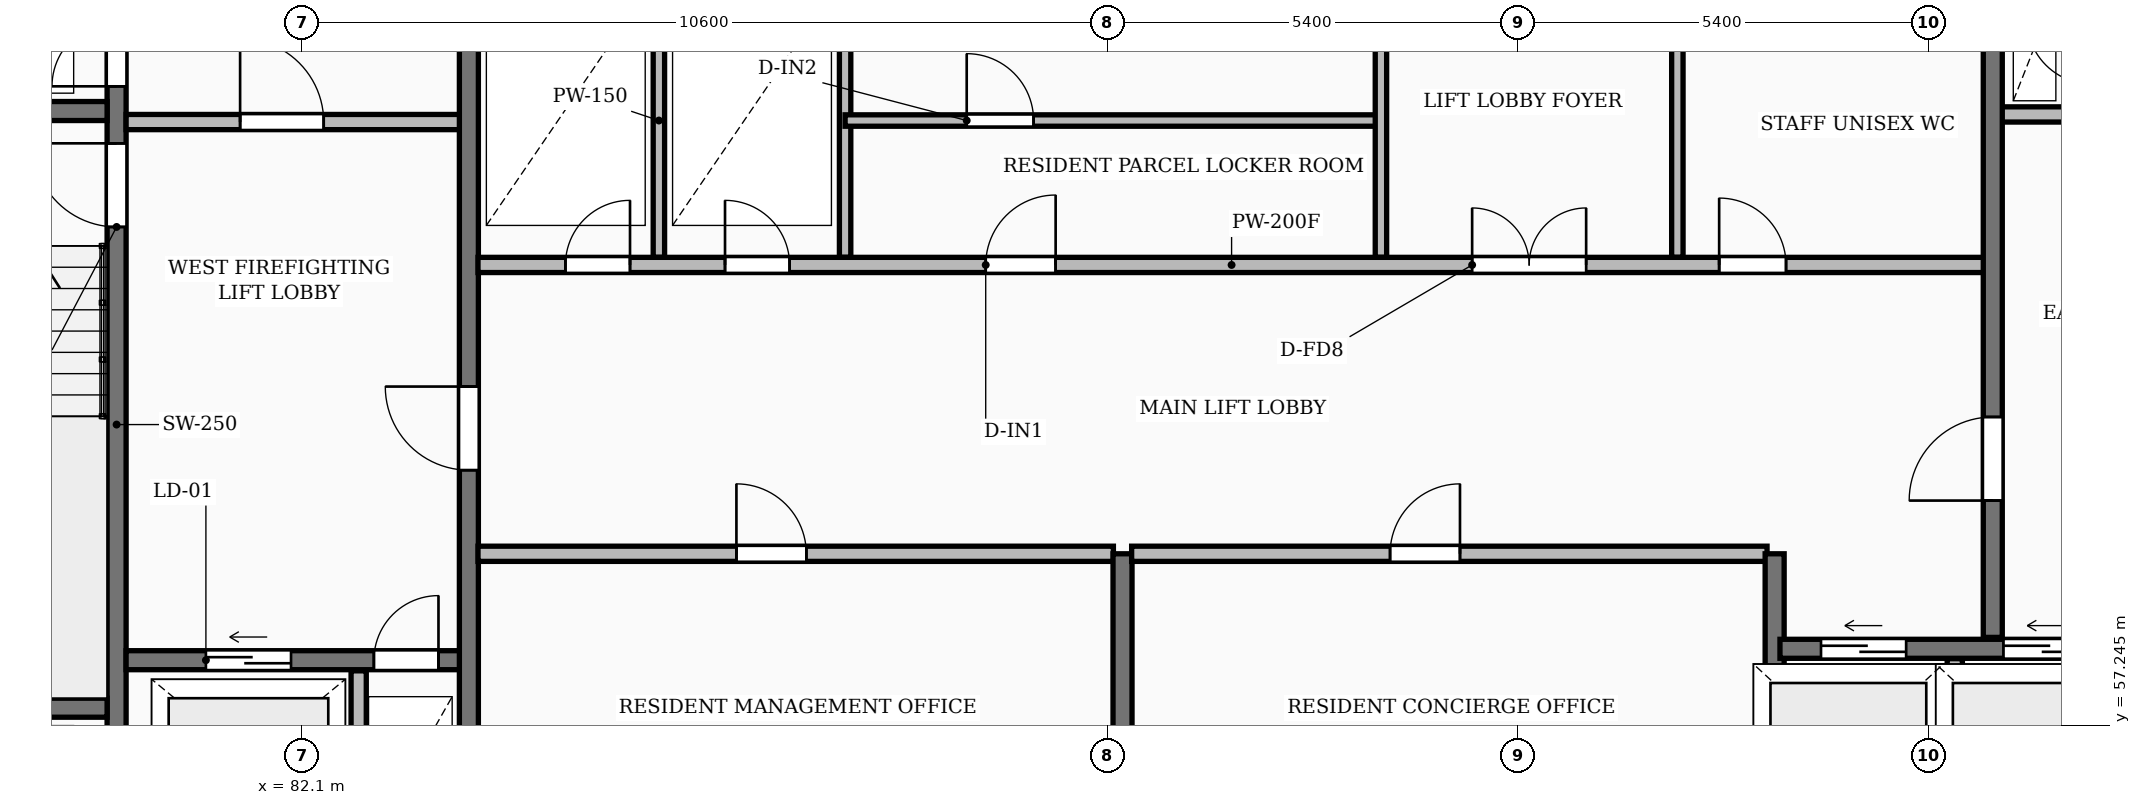
"""IFC4 building model, lengths in metres.
Left out: names, types, materials, properties, quantities, classifications, styles, units other than length and angle.
Written with IfcOpenShell. Run it as: python <this file> out.ifc"""

import sys

from ifc_helpers import new_model, si_unit, direction, frame, frame_2d, origin, place, context, subcontext, project, spatial, rectangle, extrude, element, fill, save


model = new_model("IFC4")
c1 = context("Model", 3, precision=1e-05, world=origin(), true_north=direction((0.0, 1.0)))
c2 = subcontext(c1, "Body", "Model", "MODEL_VIEW")
j1 = project(units=[si_unit("LENGTHUNIT", "METRE"), si_unit("PLANEANGLEUNIT", "RADIAN")], contexts=[c1])
p1 = place(None, origin())
s1 = spatial("IfcSite", under=j1, at=p1, CompositionType="ELEMENT")
p2 = place(p1, origin())
s2 = spatial("IfcBuilding", under=s1, at=p2, CompositionType="ELEMENT")
p3 = place(p2, frame((0.0, 0.0, 184.85)))
s3 = spatial("IfcBuildingStorey", under=s2, at=p3, CompositionType="ELEMENT", Elevation=184.85)
p4 = place(p3, frame((79.665, 55.4, 0.0), z_axis=(0.0, 0.0, 1.0), x_axis=(0.0, 1.0, 0.0)))
e1 = element("IfcWall", 1, at=p4, inside=s3, PredefinedType="SHEAR", context=c2, shape_type="SweptSolid", body=[
    extrude(rectangle(XDim=11.6, YDim=0.25, at=frame_2d((5.8, 0.0))), origin(), (0.0, 0.0, 1.0), 3.25),
])
p5 = place(p4, frame((0.55, 0.0, 0.0)))
e2 = element("IfcOpeningElement", 2, at=p5, cuts=e1, PredefinedType="OPENING", context=c2, shape_type="SweptSolid", body=[
    extrude(rectangle(XDim=0.85, YDim=2.05, at=frame_2d((0.425, 1.025))), frame((0.0, 0.135, 0.0), z_axis=(0.0, -1.0, 0.0), x_axis=(1.0, 0.0, 0.0)), (0.0, 0.0, 1.0), 0.27),
])
p6 = place(p4, frame((8.4, 0.0, 0.0)))
e3 = element("IfcOpeningElement", 3, at=p6, cuts=e1, PredefinedType="OPENING", context=c2, shape_type="SweptSolid", body=[
    extrude(rectangle(XDim=1.1, YDim=2.1, at=frame_2d((0.55, 1.05))), frame((0.0, 0.135, 0.0), z_axis=(0.0, -1.0, 0.0), x_axis=(1.0, 0.0, 0.0)), (0.0, 0.0, 1.0), 0.27),
])
p7 = place(p4, frame((10.25, 0.0, 0.0)))
e4 = element("IfcOpeningElement", 4, at=p7, cuts=e1, PredefinedType="OPENING", context=c2, shape_type="SweptSolid", body=[
    extrude(rectangle(XDim=0.85, YDim=2.05, at=frame_2d((0.425, 1.025))), frame((0.0, 0.135, 0.0), z_axis=(0.0, -1.0, 0.0), x_axis=(1.0, 0.0, 0.0)), (0.0, 0.0, 1.0), 0.27),
])
for number, where, z_axis, x_axis in (
    (5, (76.3, 57.475, 0.0), (0.0, 0.0, 1.0), (1.0, 0.0, 0.0)),
    (6, (76.3, 65.325, 0.0), (0.0, 0.0, 1.0), (1.0, 0.0, 0.0)),
):
    element("IfcWall", number, at=place(p3, frame(where, z_axis=z_axis, x_axis=x_axis)), inside=s3, PredefinedType="SHEAR", context=c2, shape_type="SweptSolid", body=[
        extrude(rectangle(XDim=3.24, YDim=0.25, at=frame_2d((1.62, 0.0))), origin(), (0.0, 0.0, 1.0), 3.25),
    ])
p8 = place(p3, frame((79.79, 58.1, 0.0), z_axis=(0.0, 0.0, 1.0), x_axis=(1.0, 0.0, 0.0)))
e7 = element("IfcWall", 7, at=p8, inside=s3, PredefinedType="SHEAR", context=c2, shape_type="SweptSolid", body=[
    extrude(rectangle(XDim=4.39, YDim=0.25, at=frame_2d((2.195, 0.0))), origin(), (0.0, 0.0, 1.0), 3.25),
])
p9 = place(p8, frame((1.05, 0.0, 0.0)))
e8 = element("IfcOpeningElement", 8, at=p9, cuts=e7, PredefinedType="OPENING", context=c2, shape_type="SweptSolid", body=[
    extrude(rectangle(XDim=1.12, YDim=2.12, at=frame_2d((0.56, 1.06))), frame((0.0, 0.135, 0.0), z_axis=(0.0, -1.0, 0.0), x_axis=(1.0, 0.0, 0.0)), (0.0, 0.0, 1.0), 0.27),
])
p10 = place(p8, frame((3.26, 0.0, 0.0)))
e9 = element("IfcOpeningElement", 9, at=p10, cuts=e7, PredefinedType="OPENING", context=c2, shape_type="SweptSolid", body=[
    extrude(rectangle(XDim=0.85, YDim=2.05, at=frame_2d((0.425, 1.025))), frame((0.0, 0.135, 0.0), z_axis=(0.0, -1.0, 0.0), x_axis=(1.0, 0.0, 0.0)), (0.0, 0.0, 1.0), 0.27),
])
p11 = place(p3, frame((82.85, 55.4, 0.0), z_axis=(0.0, 0.0, 1.0), x_axis=(0.0, 1.0, 0.0)))
e10 = element("IfcWall", 10, at=p11, inside=s3, PredefinedType="PARTITIONING", context=c2, shape_type="SweptSolid", body=[
    extrude(rectangle(XDim=2.56, YDim=0.2, at=frame_2d((1.28, 0.0))), origin(), (0.0, 0.0, 1.0), 2.97),
])
p12 = place(p3, frame((79.79, 65.18, 0.0), z_axis=(0.0, 0.0, 1.0), x_axis=(1.0, 0.0, 0.0)))
e11 = element("IfcWall", 11, at=p12, inside=s3, PredefinedType="PARTITIONING", context=c2, shape_type="SweptSolid", body=[
    extrude(rectangle(XDim=4.39, YDim=0.2, at=frame_2d((2.195, 0.0))), origin(), (0.0, 0.0, 1.0), 2.97),
])
p13 = place(p12, frame((1.5, 0.0, 0.0)))
e12 = element("IfcOpeningElement", 12, at=p13, cuts=e11, PredefinedType="OPENING", context=c2, shape_type="SweptSolid", body=[
    extrude(rectangle(XDim=1.1, YDim=2.1, at=frame_2d((0.55, 1.05))), frame((0.0, 0.11, 0.0), z_axis=(0.0, -1.0, 0.0), x_axis=(1.0, 0.0, 0.0)), (0.0, 0.0, 1.0), 0.22),
])
p14 = place(p3, frame((84.3, 55.4, 0.0), z_axis=(0.0, 0.0, 1.0), x_axis=(0.0, 1.0, 0.0)))
e13 = element("IfcWall", 13, at=p14, inside=s3, PredefinedType="SHEAR", context=c2, shape_type="SweptSolid", body=[
    extrude(rectangle(XDim=11.6, YDim=0.25, at=frame_2d((5.8, 0.0))), origin(), (0.0, 0.0, 1.0), 3.25),
])
p15 = place(p14, frame((5.2, 0.0, 0.0)))
e14 = element("IfcOpeningElement", 14, at=p15, cuts=e13, PredefinedType="OPENING", context=c2, shape_type="SweptSolid", body=[
    extrude(rectangle(XDim=1.1, YDim=2.1, at=frame_2d((0.55, 1.05))), frame((0.0, 0.135, 0.0), z_axis=(0.0, -1.0, 0.0), x_axis=(1.0, 0.0, 0.0)), (0.0, 0.0, 1.0), 0.27),
])
p16 = place(p3, frame((84.42, 59.5, 0.0), z_axis=(0.0, 0.0, 1.0), x_axis=(1.0, 0.0, 0.0)))
e15 = element("IfcWall", 15, at=p16, inside=s3, PredefinedType="PARTITIONING", context=c2, shape_type="SweptSolid", body=[
    extrude(rectangle(XDim=8.36, YDim=0.2, at=frame_2d((4.18, 0.0))), origin(), (0.0, 0.0, 1.0), 2.97),
])
p17 = place(p16, frame((3.4, 0.0, 0.0)))
e16 = element("IfcOpeningElement", 16, at=p17, cuts=e15, PredefinedType="OPENING", context=c2, shape_type="SweptSolid", body=[
    extrude(rectangle(XDim=0.92, YDim=2.08, at=frame_2d((0.46, 1.04))), frame((0.0, 0.11, 0.0), z_axis=(0.0, -1.0, 0.0), x_axis=(1.0, 0.0, 0.0)), (0.0, 0.0, 1.0), 0.22),
])
p18 = place(p3, frame((92.9, 55.4, 0.0), z_axis=(0.0, 0.0, 1.0), x_axis=(0.0, 1.0, 0.0)))
e17 = element("IfcWall", 17, at=p18, inside=s3, PredefinedType="SHEAR", context=c2, shape_type="SweptSolid", body=[
    extrude(rectangle(XDim=4.1, YDim=0.25, at=frame_2d((2.05, 0.0))), origin(), (0.0, 0.0, 1.0), 3.25),
])
p19 = place(p3, frame((93.02, 59.5, 0.0), z_axis=(0.0, 0.0, 1.0), x_axis=(1.0, 0.0, 0.0)))
e18 = element("IfcWall", 18, at=p19, inside=s3, PredefinedType="PARTITIONING", context=c2, shape_type="SweptSolid", body=[
    extrude(rectangle(XDim=8.36, YDim=0.2, at=frame_2d((4.18, 0.0))), origin(), (0.0, 0.0, 1.0), 2.97),
])
p20 = place(p19, frame((3.4, 0.0, 0.0)))
e19 = element("IfcOpeningElement", 19, at=p20, cuts=e18, PredefinedType="OPENING", context=c2, shape_type="SweptSolid", body=[
    extrude(rectangle(XDim=0.92, YDim=2.08, at=frame_2d((0.46, 1.04))), frame((0.0, 0.11, 0.0), z_axis=(0.0, -1.0, 0.0), x_axis=(1.0, 0.0, 0.0)), (0.0, 0.0, 1.0), 0.22),
])
p21 = place(p3, frame((101.48, 55.4, 0.0), z_axis=(0.0, 0.0, 1.0), x_axis=(0.0, 1.0, 0.0)))
e20 = element("IfcWall", 20, at=p21, inside=s3, PredefinedType="SHEAR", context=c2, shape_type="SweptSolid", body=[
    extrude(rectangle(XDim=4.1, YDim=0.25, at=frame_2d((2.05, 0.0))), origin(), (0.0, 0.0, 1.0), 3.25),
])
p22 = place(p3, frame((103.85, 55.4, 0.0), z_axis=(0.0, 0.0, 1.0), x_axis=(0.0, 1.0, 0.0)))
e21 = element("IfcWall", 21, at=p22, inside=s3, PredefinedType="PARTITIONING", context=c2, shape_type="SweptSolid", body=[
    extrude(rectangle(XDim=2.72, YDim=0.2, at=frame_2d((1.36, 0.0))), origin(), (0.0, 0.0, 1.0), 2.97),
])
p23 = place(p3, frame((101.55, 58.25, 0.0), z_axis=(0.0, 0.0, 1.0), x_axis=(1.0, 0.0, 0.0)))
e22 = element("IfcWall", 22, at=p23, inside=s3, PredefinedType="SHEAR", context=c2, shape_type="SweptSolid", body=[
    extrude(rectangle(XDim=4.6, YDim=0.25, at=frame_2d((2.3, 0.0))), origin(), (0.0, 0.0, 1.0), 3.25),
])
p24 = place(p23, frame((0.54, 0.0, 0.0)))
e23 = element("IfcOpeningElement", 23, at=p24, cuts=e22, PredefinedType="OPENING", context=c2, shape_type="SweptSolid", body=[
    extrude(rectangle(XDim=1.12, YDim=2.12, at=frame_2d((0.56, 1.06))), frame((0.0, 0.135, 0.0), z_axis=(0.0, -1.0, 0.0), x_axis=(1.0, 0.0, 0.0)), (0.0, 0.0, 1.0), 0.27),
])
p25 = place(p23, frame((2.94, 0.0, 0.0)))
e24 = element("IfcOpeningElement", 24, at=p25, cuts=e22, PredefinedType="OPENING", context=c2, shape_type="SweptSolid", body=[
    extrude(rectangle(XDim=1.12, YDim=2.12, at=frame_2d((0.56, 1.06))), frame((0.0, 0.135, 0.0), z_axis=(0.0, -1.0, 0.0), x_axis=(1.0, 0.0, 0.0)), (0.0, 0.0, 1.0), 0.27),
])
for number, where, z_axis, x_axis in (
    (25, (86.8, 63.4, 0.0), (0.0, 0.0, 1.0), (0.0, 1.0, 0.0)),
    (26, (89.25, 63.4, 0.0), (0.0, 0.0, 1.0), (0.0, 1.0, 0.0)),
):
    element("IfcWall", number, at=place(p3, frame(where, z_axis=z_axis, x_axis=x_axis)), inside=s3, PredefinedType="PARTITIONING", context=c2, shape_type="SweptSolid", body=[
        extrude(rectangle(XDim=3.6, YDim=0.15, at=frame_2d((1.8, 0.0))), origin(), (0.0, 0.0, 1.0), 2.97),
    ])
p26 = place(p3, frame((89.25, 65.2, 0.0), z_axis=(0.0, 0.0, 1.0), x_axis=(1.0, 0.0, 0.0)))
e27 = element("IfcWall", 27, at=p26, inside=s3, PredefinedType="PARTITIONING", context=c2, shape_type="SweptSolid", body=[
    extrude(rectangle(XDim=7.05, YDim=0.15, at=frame_2d((3.525, 0.0))), origin(), (0.0, 0.0, 1.0), 2.97),
])
p27 = place(p26, frame((1.6, 0.0, 0.0)))
e28 = element("IfcOpeningElement", 28, at=p27, cuts=e27, PredefinedType="OPENING", context=c2, shape_type="SweptSolid", body=[
    extrude(rectangle(XDim=0.88, YDim=2.06, at=frame_2d((0.44, 1.03))), frame((0.0, 0.085, 0.0), z_axis=(0.0, -1.0, 0.0), x_axis=(1.0, 0.0, 0.0)), (0.0, 0.0, 1.0), 0.17),
])
for number, where, z_axis, x_axis in (
    (29, (96.3, 63.4, 0.0), (0.0, 0.0, 1.0), (0.0, 1.0, 0.0)),
    (30, (100.2, 63.4, 0.0), (0.0, 0.0, 1.0), (0.0, 1.0, 0.0)),
):
    element("IfcWall", number, at=place(p3, frame(where, z_axis=z_axis, x_axis=x_axis)), inside=s3, PredefinedType="PARTITIONING", context=c2, shape_type="SweptSolid", body=[
        extrude(rectangle(XDim=3.6, YDim=0.15, at=frame_2d((1.8, 0.0))), origin(), (0.0, 0.0, 1.0), 2.97),
    ])
p28 = place(p3, frame((84.42, 63.3, 0.0), z_axis=(0.0, 0.0, 1.0), x_axis=(1.0, 0.0, 0.0)))
e31 = element("IfcWall", 31, at=p28, inside=s3, PredefinedType="PARTITIONING", context=c2, shape_type="SweptSolid", body=[
    extrude(rectangle(XDim=19.83, YDim=0.2, at=frame_2d((9.915, 0.0))), origin(), (0.0, 0.0, 1.0), 2.97),
])
p29 = place(p28, frame((1.15, 0.0, 0.0)))
e32 = element("IfcOpeningElement", 32, at=p29, cuts=e31, PredefinedType="OPENING", context=c2, shape_type="SweptSolid", body=[
    extrude(rectangle(XDim=0.85, YDim=2.05, at=frame_2d((0.425, 1.025))), frame((0.0, 0.11, 0.0), z_axis=(0.0, -1.0, 0.0), x_axis=(1.0, 0.0, 0.0)), (0.0, 0.0, 1.0), 0.22),
])
p30 = place(p28, frame((3.25, 0.0, 0.0)))
e33 = element("IfcOpeningElement", 33, at=p30, cuts=e31, PredefinedType="OPENING", context=c2, shape_type="SweptSolid", body=[
    extrude(rectangle(XDim=0.85, YDim=2.05, at=frame_2d((0.425, 1.025))), frame((0.0, 0.11, 0.0), z_axis=(0.0, -1.0, 0.0), x_axis=(1.0, 0.0, 0.0)), (0.0, 0.0, 1.0), 0.22),
])
p31 = place(p28, frame((13.08, 0.0, 0.0)))
e34 = element("IfcOpeningElement", 34, at=p31, cuts=e31, PredefinedType="OPENING", context=c2, shape_type="SweptSolid", body=[
    extrude(rectangle(XDim=1.5, YDim=2.2, at=frame_2d((0.75, 1.1))), frame((0.0, 0.11, 0.0), z_axis=(0.0, -1.0, 0.0), x_axis=(1.0, 0.0, 0.0)), (0.0, 0.0, 1.0), 0.22),
])
p32 = place(p28, frame((6.68, 0.0, 0.0)))
e35 = element("IfcOpeningElement", 35, at=p32, cuts=e31, PredefinedType="OPENING", context=c2, shape_type="SweptSolid", body=[
    extrude(rectangle(XDim=0.92, YDim=2.08, at=frame_2d((0.46, 1.04))), frame((0.0, 0.11, 0.0), z_axis=(0.0, -1.0, 0.0), x_axis=(1.0, 0.0, 0.0)), (0.0, 0.0, 1.0), 0.22),
])
p33 = place(p28, frame((16.33, 0.0, 0.0)))
e36 = element("IfcOpeningElement", 36, at=p33, cuts=e31, PredefinedType="OPENING", context=c2, shape_type="SweptSolid", body=[
    extrude(rectangle(XDim=0.88, YDim=2.06, at=frame_2d((0.44, 1.03))), frame((0.0, 0.11, 0.0), z_axis=(0.0, -1.0, 0.0), x_axis=(1.0, 0.0, 0.0)), (0.0, 0.0, 1.0), 0.22),
])
p34 = place(p3, frame((104.45, 65.28, 0.0), z_axis=(0.0, 0.0, 1.0), x_axis=(1.0, 0.0, 0.0)))
e37 = element("IfcWall", 37, at=p34, inside=s3, PredefinedType="PARTITIONING", context=c2, shape_type="SweptSolid", body=[
    extrude(rectangle(XDim=1.2, YDim=0.2, at=frame_2d((0.6, 0.0))), origin(), (0.0, 0.0, 1.0), 2.97),
])
p35 = place(p3, frame((104.35, 58.4, 0.0), z_axis=(0.0, 0.0, 1.0), x_axis=(0.0, 1.0, 0.0)))
e38 = element("IfcWall", 38, at=p35, inside=s3, PredefinedType="SHEAR", context=c2, shape_type="SweptSolid", body=[
    extrude(rectangle(XDim=8.6, YDim=0.25, at=frame_2d((4.3, 0.0))), origin(), (0.0, 0.0, 1.0), 3.25),
])
p36 = place(p35, frame((1.8, 0.0, 0.0)))
e39 = element("IfcOpeningElement", 39, at=p36, cuts=e38, PredefinedType="OPENING", context=c2, shape_type="SweptSolid", body=[
    extrude(rectangle(XDim=1.1, YDim=2.1, at=frame_2d((0.55, 1.05))), frame((0.0, 0.135, 0.0), z_axis=(0.0, -1.0, 0.0), x_axis=(1.0, 0.0, 0.0)), (0.0, 0.0, 1.0), 0.27),
])
p37 = place(p6, origin())
e40 = element("IfcDoor", 40, at=p37, inside=s3, OperationType="SINGLE_SWING_RIGHT", PredefinedType="DOOR", context=c2, shape_type="SweptSolid", body=[
    extrude(rectangle(XDim=1.1, YDim=2.1, at=frame_2d((0.55, 1.05))), frame((0.0, 0.025, 0.0), z_axis=(0.0, -1.0, 0.0), x_axis=(1.0, 0.0, 0.0)), (0.0, 0.0, 1.0), 0.05),
])
fill(e3, e40)
p38 = place(p7, origin())
e41 = element("IfcDoor", 41, at=p38, inside=s3, OperationType="SINGLE_SWING_LEFT", PredefinedType="DOOR", context=c2, shape_type="SweptSolid", body=[
    extrude(rectangle(XDim=0.85, YDim=2.05, at=frame_2d((0.425, 1.025))), frame((0.0, 0.025, 0.0), z_axis=(0.0, -1.0, 0.0), x_axis=(1.0, 0.0, 0.0)), (0.0, 0.0, 1.0), 0.05),
])
fill(e4, e41)
p39 = place(p9, origin())
e42 = element("IfcDoor", 42, at=p39, inside=s3, OperationType="SLIDING_TO_LEFT", PredefinedType="DOOR", context=c2, shape_type="SweptSolid", body=[
    extrude(rectangle(XDim=1.12, YDim=2.12, at=frame_2d((0.56, 1.06))), frame((0.0, 0.025, 0.0), z_axis=(0.0, -1.0, 0.0), x_axis=(1.0, 0.0, 0.0)), (0.0, 0.0, 1.0), 0.05),
])
fill(e8, e42)
p40 = place(p10, origin())
e43 = element("IfcDoor", 43, at=p40, inside=s3, OperationType="SINGLE_SWING_RIGHT", PredefinedType="DOOR", context=c2, shape_type="SweptSolid", body=[
    extrude(rectangle(XDim=0.85, YDim=2.05, at=frame_2d((0.425, 1.025))), frame((0.0, 0.025, 0.0), z_axis=(0.0, -1.0, 0.0), x_axis=(1.0, 0.0, 0.0)), (0.0, 0.0, 1.0), 0.05),
])
fill(e9, e43)
p41 = place(p13, origin())
e44 = element("IfcDoor", 44, at=p41, inside=s3, OperationType="SINGLE_SWING_LEFT", PredefinedType="DOOR", context=c2, shape_type="SweptSolid", body=[
    extrude(rectangle(XDim=1.1, YDim=2.1, at=frame_2d((0.55, 1.05))), frame((0.0, 0.025, 0.0), z_axis=(0.0, -1.0, 0.0), x_axis=(1.0, 0.0, 0.0)), (0.0, 0.0, 1.0), 0.05),
])
fill(e12, e44)
p42 = place(p15, origin())
e45 = element("IfcDoor", 45, at=p42, inside=s3, OperationType="SINGLE_SWING_RIGHT", PredefinedType="DOOR", context=c2, shape_type="SweptSolid", body=[
    extrude(rectangle(XDim=1.1, YDim=2.1, at=frame_2d((0.55, 1.05))), frame((0.0, 0.025, 0.0), z_axis=(0.0, -1.0, 0.0), x_axis=(1.0, 0.0, 0.0)), (0.0, 0.0, 1.0), 0.05),
])
fill(e14, e45)
p43 = place(p17, origin())
e46 = element("IfcDoor", 46, at=p43, inside=s3, OperationType="SINGLE_SWING_LEFT", PredefinedType="DOOR", context=c2, shape_type="SweptSolid", body=[
    extrude(rectangle(XDim=0.92, YDim=2.08, at=frame_2d((0.46, 1.04))), frame((0.0, 0.025, 0.0), z_axis=(0.0, -1.0, 0.0), x_axis=(1.0, 0.0, 0.0)), (0.0, 0.0, 1.0), 0.05),
])
fill(e16, e46)
p44 = place(p20, origin())
e47 = element("IfcDoor", 47, at=p44, inside=s3, OperationType="SINGLE_SWING_RIGHT", PredefinedType="DOOR", context=c2, shape_type="SweptSolid", body=[
    extrude(rectangle(XDim=0.92, YDim=2.08, at=frame_2d((0.46, 1.04))), frame((0.0, 0.025, 0.0), z_axis=(0.0, -1.0, 0.0), x_axis=(1.0, 0.0, 0.0)), (0.0, 0.0, 1.0), 0.05),
])
fill(e19, e47)
p45 = place(p24, origin())
e48 = element("IfcDoor", 48, at=p45, inside=s3, OperationType="SLIDING_TO_LEFT", PredefinedType="DOOR", context=c2, shape_type="SweptSolid", body=[
    extrude(rectangle(XDim=1.12, YDim=2.12, at=frame_2d((0.56, 1.06))), frame((0.0, 0.025, 0.0), z_axis=(0.0, -1.0, 0.0), x_axis=(1.0, 0.0, 0.0)), (0.0, 0.0, 1.0), 0.05),
])
fill(e23, e48)
p46 = place(p25, origin())
e49 = element("IfcDoor", 49, at=p46, inside=s3, OperationType="SLIDING_TO_LEFT", PredefinedType="DOOR", context=c2, shape_type="SweptSolid", body=[
    extrude(rectangle(XDim=1.12, YDim=2.12, at=frame_2d((0.56, 1.06))), frame((0.0, 0.025, 0.0), z_axis=(0.0, -1.0, 0.0), x_axis=(1.0, 0.0, 0.0)), (0.0, 0.0, 1.0), 0.05),
])
fill(e24, e49)
p47 = place(p27, origin())
e50 = element("IfcDoor", 50, at=p47, inside=s3, OperationType="SINGLE_SWING_LEFT", PredefinedType="DOOR", context=c2, shape_type="SweptSolid", body=[
    extrude(rectangle(XDim=0.88, YDim=2.06, at=frame_2d((0.44, 1.03))), frame((0.0, 0.025, 0.0), z_axis=(0.0, -1.0, 0.0), x_axis=(1.0, 0.0, 0.0)), (0.0, 0.0, 1.0), 0.05),
])
fill(e28, e50)
p48 = place(p29, origin())
e51 = element("IfcDoor", 51, at=p48, inside=s3, OperationType="SINGLE_SWING_RIGHT", PredefinedType="DOOR", context=c2, shape_type="SweptSolid", body=[
    extrude(rectangle(XDim=0.85, YDim=2.05, at=frame_2d((0.425, 1.025))), frame((0.0, 0.025, 0.0), z_axis=(0.0, -1.0, 0.0), x_axis=(1.0, 0.0, 0.0)), (0.0, 0.0, 1.0), 0.05),
])
fill(e32, e51)
p49 = place(p30, origin())
e52 = element("IfcDoor", 52, at=p49, inside=s3, OperationType="SINGLE_SWING_LEFT", PredefinedType="DOOR", context=c2, shape_type="SweptSolid", body=[
    extrude(rectangle(XDim=0.85, YDim=2.05, at=frame_2d((0.425, 1.025))), frame((0.0, 0.025, 0.0), z_axis=(0.0, -1.0, 0.0), x_axis=(1.0, 0.0, 0.0)), (0.0, 0.0, 1.0), 0.05),
])
fill(e33, e52)
p50 = place(p31, origin())
e53 = element("IfcDoor", 53, at=p50, inside=s3, OperationType="DOUBLE_DOOR_SINGLE_SWING", PredefinedType="DOOR", context=c2, shape_type="SweptSolid", body=[
    extrude(rectangle(XDim=1.5, YDim=2.2, at=frame_2d((0.75, 1.1))), frame((0.0, 0.025, 0.0), z_axis=(0.0, -1.0, 0.0), x_axis=(1.0, 0.0, 0.0)), (0.0, 0.0, 1.0), 0.05),
])
fill(e34, e53)
p51 = place(p32, origin())
e54 = element("IfcDoor", 54, at=p51, inside=s3, OperationType="SINGLE_SWING_RIGHT", PredefinedType="DOOR", context=c2, shape_type="SweptSolid", body=[
    extrude(rectangle(XDim=0.92, YDim=2.08, at=frame_2d((0.46, 1.04))), frame((0.0, 0.025, 0.0), z_axis=(0.0, -1.0, 0.0), x_axis=(1.0, 0.0, 0.0)), (0.0, 0.0, 1.0), 0.05),
])
fill(e35, e54)
p52 = place(p33, origin())
e55 = element("IfcDoor", 55, at=p52, inside=s3, OperationType="SINGLE_SWING_LEFT", PredefinedType="DOOR", context=c2, shape_type="SweptSolid", body=[
    extrude(rectangle(XDim=0.88, YDim=2.06, at=frame_2d((0.44, 1.03))), frame((0.0, 0.025, 0.0), z_axis=(0.0, -1.0, 0.0), x_axis=(1.0, 0.0, 0.0)), (0.0, 0.0, 1.0), 0.05),
])
fill(e36, e55)
p53 = place(p36, origin())
e56 = element("IfcDoor", 56, at=p53, inside=s3, OperationType="SINGLE_SWING_LEFT", PredefinedType="DOOR", context=c2, shape_type="SweptSolid", body=[
    extrude(rectangle(XDim=1.1, YDim=2.1, at=frame_2d((0.55, 1.05))), frame((0.0, 0.025, 0.0), z_axis=(0.0, -1.0, 0.0), x_axis=(1.0, 0.0, 0.0)), (0.0, 0.0, 1.0), 0.05),
])
fill(e39, e56)
save(model, sys.argv[1])
